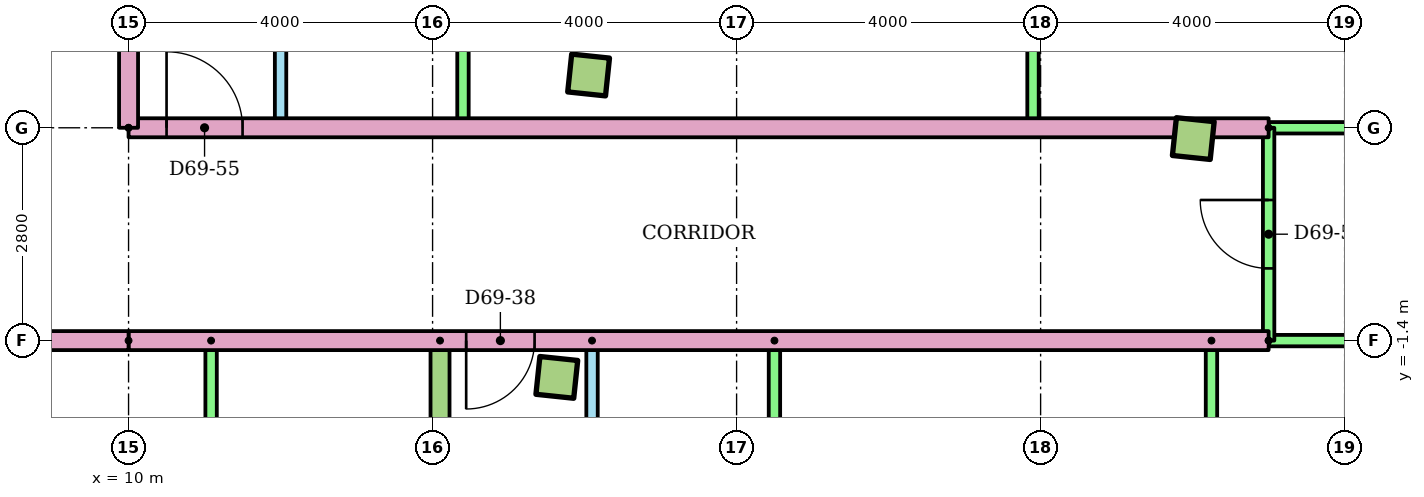
"""IFC4 building model, lengths in metres.
Left out: names, types, materials, properties, quantities, classifications, styles, units other than length and angle.
Written with IfcOpenShell. Run it as: python <this file> out.ifc"""

import sys

from ifc_helpers import new_model, si_unit, direction, frame, frame_2d, origin, origin_2d, place, context, subcontext, project, spatial, rectangle, extrude, element, fill, save


model = new_model("IFC4")
c1 = context("Model", 3, precision=1e-05, world=origin(), true_north=direction((0.0, 1.0)))
c2 = subcontext(c1, "Body", "Model", "MODEL_VIEW")
j1 = project(units=[si_unit("LENGTHUNIT", "METRE"), si_unit("PLANEANGLEUNIT", "RADIAN")], contexts=[c1])
p1 = place(None, origin())
s1 = spatial("IfcSite", under=j1, at=p1, CompositionType="ELEMENT")
p2 = place(p1, origin())
s2 = spatial("IfcBuilding", under=s1, at=p2, CompositionType="ELEMENT")
p3 = place(p2, frame((0.0, 0.0, 265.9)))
s3 = spatial("IfcBuildingStorey", under=s2, at=p3, CompositionType="ELEMENT", Elevation=265.9)
for number, where, z_axis, x_axis in (
    (1, (15.635, -1.884, 0.0), (0.0, 0.0, 1.0), (0.995, -0.105, 0.0)),
    (2, (16.053, 2.094, 0.0), (0.0, 0.0, 1.0), (0.995, -0.105, 0.0)),
    (3, (24.009, 1.258, 0.0), (0.0, 0.0, 1.0), (0.995, -0.105, 0.0)),
):
    element("IfcColumn", number, at=place(p3, frame(where, z_axis=z_axis, x_axis=x_axis)), inside=s3, PredefinedType="COLUMN", context=c2, shape_type="SweptSolid", body=[
        extrude(rectangle(XDim=0.5, YDim=0.5, at=origin_2d()), origin(), (0.0, 0.0, 1.0), 3.2),
    ])
p4 = place(p3, frame((11.086, -1.4, 0.0), z_axis=(0.0, 0.0, 1.0), x_axis=(0.0, -1.0, 0.0)))
e4 = element("IfcWall", 4, at=p4, inside=s3, PredefinedType="PARTITIONING", context=c2, shape_type="SweptSolid", body=[
    extrude(rectangle(XDim=7.484, YDim=0.15, at=frame_2d((3.742, 0.0))), origin(), (0.0, 0.0, 1.0), 2.4),
])
p5 = place(p3, frame((16.098, -1.4, 0.0), z_axis=(0.0, 0.0, 1.0), x_axis=(0.0, -1.0, 0.0)))
e5 = element("IfcWall", 5, at=p5, inside=s3, PredefinedType="PARTITIONING", context=c2, shape_type="SweptSolid", body=[
    extrude(rectangle(XDim=8.982, YDim=0.15, at=frame_2d((4.491, 0.0))), origin(), (0.0, 0.0, 1.0), 2.4),
])
p6 = place(p5, frame((2.05, 0.0, 0.0)))
e6 = element("IfcOpeningElement", 6, at=p6, cuts=e5, PredefinedType="OPENING", context=c2, shape_type="SweptSolid", body=[
    extrude(rectangle(XDim=0.9, YDim=2.1, at=frame_2d((0.45, 1.05))), frame((0.0, 0.085, 0.0), z_axis=(0.0, -1.0, 0.0), x_axis=(1.0, 0.0, 0.0)), (0.0, 0.0, 1.0), 0.17),
])
p7 = place(p5, frame((6.591, 0.0, 0.0)))
e7 = element("IfcOpeningElement", 7, at=p7, cuts=e5, PredefinedType="OPENING", context=c2, shape_type="SweptSolid", body=[
    extrude(rectangle(XDim=0.8, YDim=2.1, at=frame_2d((0.4, 1.05))), frame((0.0, 0.085, 0.0), z_axis=(0.0, -1.0, 0.0), x_axis=(1.0, 0.0, 0.0)), (0.0, 0.0, 1.0), 0.17),
])
for number, where, z_axis, x_axis in (
    (8, (18.498, -1.4, 0.0), (0.0, 0.0, 1.0), (0.0, -1.0, 0.0)),
    (9, (24.248, -1.4, 0.0), (0.0, 0.0, 1.0), (0.0, -1.0, 0.0)),
):
    element("IfcWall", number, at=place(p3, frame(where, z_axis=z_axis, x_axis=x_axis)), inside=s3, PredefinedType="PARTITIONING", context=c2, shape_type="SweptSolid", body=[
        extrude(rectangle(XDim=8.982, YDim=0.15, at=frame_2d((4.491, 0.0))), origin(), (0.0, 0.0, 1.0), 2.4),
    ])
p8 = place(p3, frame((14.098, -1.4, 0.0), z_axis=(0.0, 0.0, 1.0), x_axis=(0.0, -1.0, 0.0)))
e10 = element("IfcWall", 10, at=p8, inside=s3, PredefinedType="PARTITIONING", context=c2, shape_type="SweptSolid", body=[
    extrude(rectangle(XDim=15.013, YDim=0.25, at=frame_2d((7.506, 0.0))), origin(), (0.0, 0.0, 1.0), 2.4),
])
p9 = place(p3, frame((25.0, -1.4, 0.0), z_axis=(0.0, 0.0, 1.0), x_axis=(-1.0, 0.0, 0.0)))
e11 = element("IfcWall", 11, at=p9, inside=s3, PredefinedType="PARTITIONING", context=c2, shape_type="SweptSolid", body=[
    extrude(rectangle(XDim=15.0, YDim=0.25, at=frame_2d((7.5, 0.0))), origin(), (0.0, 0.0, 1.0), 2.4),
])
p10 = place(p9, frame((9.658, 0.0, 0.0)))
e12 = element("IfcOpeningElement", 12, at=p10, cuts=e11, PredefinedType="OPENING", context=c2, shape_type="SweptSolid", body=[
    extrude(rectangle(XDim=0.9, YDim=2.1, at=frame_2d((0.45, 1.05))), frame((0.0, 0.135, 0.0), z_axis=(0.0, -1.0, 0.0), x_axis=(1.0, 0.0, 0.0)), (0.0, 0.0, 1.0), 0.27),
])
p11 = place(p3, frame((30.798, -1.4, 0.0), z_axis=(0.0, 0.0, 1.0), x_axis=(-1.0, 0.0, 0.0)))
e13 = element("IfcWall", 13, at=p11, inside=s3, PredefinedType="PARTITIONING", context=c2, shape_type="SweptSolid", body=[
    extrude(rectangle(XDim=5.798, YDim=0.15, at=frame_2d((2.899, 0.0))), origin(), (0.0, 0.0, 1.0), 2.4),
])
p12 = place(p3, frame((12.0, 12.143, 0.0), z_axis=(0.0, 0.0, 1.0), x_axis=(0.0, -1.0, 0.0)))
e14 = element("IfcWall", 14, at=p12, inside=s3, PredefinedType="PARTITIONING", context=c2, shape_type="SweptSolid", body=[
    extrude(rectangle(XDim=10.743, YDim=0.15, at=frame_2d((5.372, 0.0))), origin(), (0.0, 0.0, 1.0), 2.4),
])
p13 = place(p12, frame((7.293, 0.0, 0.0)))
e15 = element("IfcOpeningElement", 15, at=p13, cuts=e14, PredefinedType="OPENING", context=c2, shape_type="SweptSolid", body=[
    extrude(rectangle(XDim=0.9, YDim=2.1, at=frame_2d((0.45, 1.05))), frame((0.0, 0.085, 0.0), z_axis=(0.0, -1.0, 0.0), x_axis=(1.0, 0.0, 0.0)), (0.0, 0.0, 1.0), 0.17),
])
p14 = place(p12, frame((1.972, 0.0, 0.0)))
e16 = element("IfcOpeningElement", 16, at=p14, cuts=e14, PredefinedType="OPENING", context=c2, shape_type="SweptSolid", body=[
    extrude(rectangle(XDim=0.8, YDim=2.1, at=frame_2d((0.4, 1.05))), frame((0.0, 0.085, 0.0), z_axis=(0.0, -1.0, 0.0), x_axis=(1.0, 0.0, 0.0)), (0.0, 0.0, 1.0), 0.17),
])
for number, where, z_axis, x_axis in (
    (17, (14.4, 12.143, 0.0), (0.0, 0.0, 1.0), (0.0, -1.0, 0.0)),
    (18, (21.9, 12.143, 0.0), (0.0, 0.0, 1.0), (0.0, -1.0, 0.0)),
):
    element("IfcWall", number, at=place(p3, frame(where, z_axis=z_axis, x_axis=x_axis)), inside=s3, PredefinedType="PARTITIONING", context=c2, shape_type="SweptSolid", body=[
        extrude(rectangle(XDim=10.743, YDim=0.15, at=frame_2d((5.372, 0.0))), origin(), (0.0, 0.0, 1.0), 2.4),
    ])
p15 = place(p3, frame((10.0, 1.4, 0.0)))
e19 = element("IfcWall", 19, at=p15, inside=s3, PredefinedType="PARTITIONING", context=c2, shape_type="SweptSolid", body=[
    extrude(rectangle(XDim=15.0, YDim=0.25, at=frame_2d((7.5, 0.0))), origin(), (0.0, 0.0, 1.0), 2.4),
])
p16 = place(p15, frame((0.5, 0.0, 0.0)))
e20 = element("IfcOpeningElement", 20, at=p16, cuts=e19, PredefinedType="OPENING", context=c2, shape_type="SweptSolid", body=[
    extrude(rectangle(XDim=1.0, YDim=2.1, at=frame_2d((0.5, 1.05))), frame((0.0, 0.135, 0.0), z_axis=(0.0, -1.0, 0.0), x_axis=(1.0, 0.0, 0.0)), (0.0, 0.0, 1.0), 0.27),
])
p17 = place(p3, frame((25.0, 1.4, 0.0)))
e21 = element("IfcWall", 21, at=p17, inside=s3, PredefinedType="PARTITIONING", context=c2, shape_type="SweptSolid", body=[
    extrude(rectangle(XDim=6.093, YDim=0.15, at=frame_2d((3.046, 0.0))), origin(), (0.0, 0.0, 1.0), 2.4),
])
p18 = place(p3, frame((25.0, -1.4, 0.0), z_axis=(0.0, 0.0, 1.0), x_axis=(0.0, 1.0, 0.0)))
e22 = element("IfcWall", 22, at=p18, inside=s3, PredefinedType="PARTITIONING", context=c2, shape_type="SweptSolid", body=[
    extrude(rectangle(XDim=2.8, YDim=0.15, at=frame_2d((1.4, 0.0))), origin(), (0.0, 0.0, 1.0), 2.4),
])
p19 = place(p18, frame((0.95, 0.0, 0.0)))
e23 = element("IfcOpeningElement", 23, at=p19, cuts=e22, PredefinedType="OPENING", context=c2, shape_type="SweptSolid", body=[
    extrude(rectangle(XDim=0.9, YDim=2.1, at=frame_2d((0.45, 1.05))), frame((0.0, 0.085, 0.0), z_axis=(0.0, -1.0, 0.0), x_axis=(1.0, 0.0, 0.0)), (0.0, 0.0, 1.0), 0.17),
])
p20 = place(p3, frame((10.0, -1.4, 0.0), z_axis=(0.0, 0.0, 1.0), x_axis=(-1.0, 0.0, 0.0)))
e24 = element("IfcWall", 24, at=p20, inside=s3, PredefinedType="PARTITIONING", context=c2, shape_type="SweptSolid", body=[
    extrude(rectangle(XDim=20.0, YDim=0.25, at=frame_2d((10.0, 0.0))), origin(), (0.0, 0.0, 1.0), 2.4),
])
p21 = place(p20, frame((12.314, 0.0, 0.0)))
e25 = element("IfcOpeningElement", 25, at=p21, cuts=e24, PredefinedType="OPENING", context=c2, shape_type="SweptSolid", body=[
    extrude(rectangle(XDim=1.0, YDim=2.1, at=frame_2d((0.5, 1.05))), frame((0.0, 0.135, 0.0), z_axis=(0.0, -1.0, 0.0), x_axis=(1.0, 0.0, 0.0)), (0.0, 0.0, 1.0), 0.27),
])
p22 = place(p20, frame((10.57, 0.0, 0.0)))
e26 = element("IfcOpeningElement", 26, at=p22, cuts=e24, PredefinedType="OPENING", context=c2, shape_type="SweptSolid", body=[
    extrude(rectangle(XDim=0.9, YDim=2.1, at=frame_2d((0.45, 1.05))), frame((0.0, 0.135, 0.0), z_axis=(0.0, -1.0, 0.0), x_axis=(1.0, 0.0, 0.0)), (0.0, 0.0, 1.0), 0.27),
])
p23 = place(p3, frame((10.0, 1.4, 0.0), z_axis=(0.0, 0.0, 1.0), x_axis=(0.0, 1.0, 0.0)))
e27 = element("IfcWall", 27, at=p23, inside=s3, PredefinedType="PARTITIONING", context=c2, shape_type="SweptSolid", body=[
    extrude(rectangle(XDim=1.6, YDim=0.25, at=frame_2d((0.8, 0.0))), origin(), (0.0, 0.0, 1.0), 2.4),
])
p24 = place(p10, origin())
e28 = element("IfcDoor", 28, at=p24, inside=s3, OperationType="SINGLE_SWING_RIGHT", PredefinedType="DOOR", context=c2, shape_type="SweptSolid", body=[
    extrude(rectangle(XDim=0.9, YDim=2.1, at=frame_2d((0.45, 1.05))), frame((0.0, 0.025, 0.0), z_axis=(0.0, -1.0, 0.0), x_axis=(1.0, 0.0, 0.0)), (0.0, 0.0, 1.0), 0.05),
])
fill(e12, e28)
p25 = place(p16, origin())
e29 = element("IfcDoor", 29, at=p25, inside=s3, OperationType="SINGLE_SWING_LEFT", PredefinedType="DOOR", context=c2, shape_type="SweptSolid", body=[
    extrude(rectangle(XDim=1.0, YDim=2.1, at=frame_2d((0.5, 1.05))), frame((0.0, 0.025, 0.0), z_axis=(0.0, -1.0, 0.0), x_axis=(1.0, 0.0, 0.0)), (0.0, 0.0, 1.0), 0.05),
])
fill(e20, e29)
p26 = place(p19, origin())
e30 = element("IfcDoor", 30, at=p26, inside=s3, OperationType="SINGLE_SWING_RIGHT", PredefinedType="DOOR", context=c2, shape_type="SweptSolid", body=[
    extrude(rectangle(XDim=0.9, YDim=2.1, at=frame_2d((0.45, 1.05))), frame((0.0, 0.025, 0.0), z_axis=(0.0, -1.0, 0.0), x_axis=(1.0, 0.0, 0.0)), (0.0, 0.0, 1.0), 0.05),
])
fill(e23, e30)
save(model, sys.argv[1])
